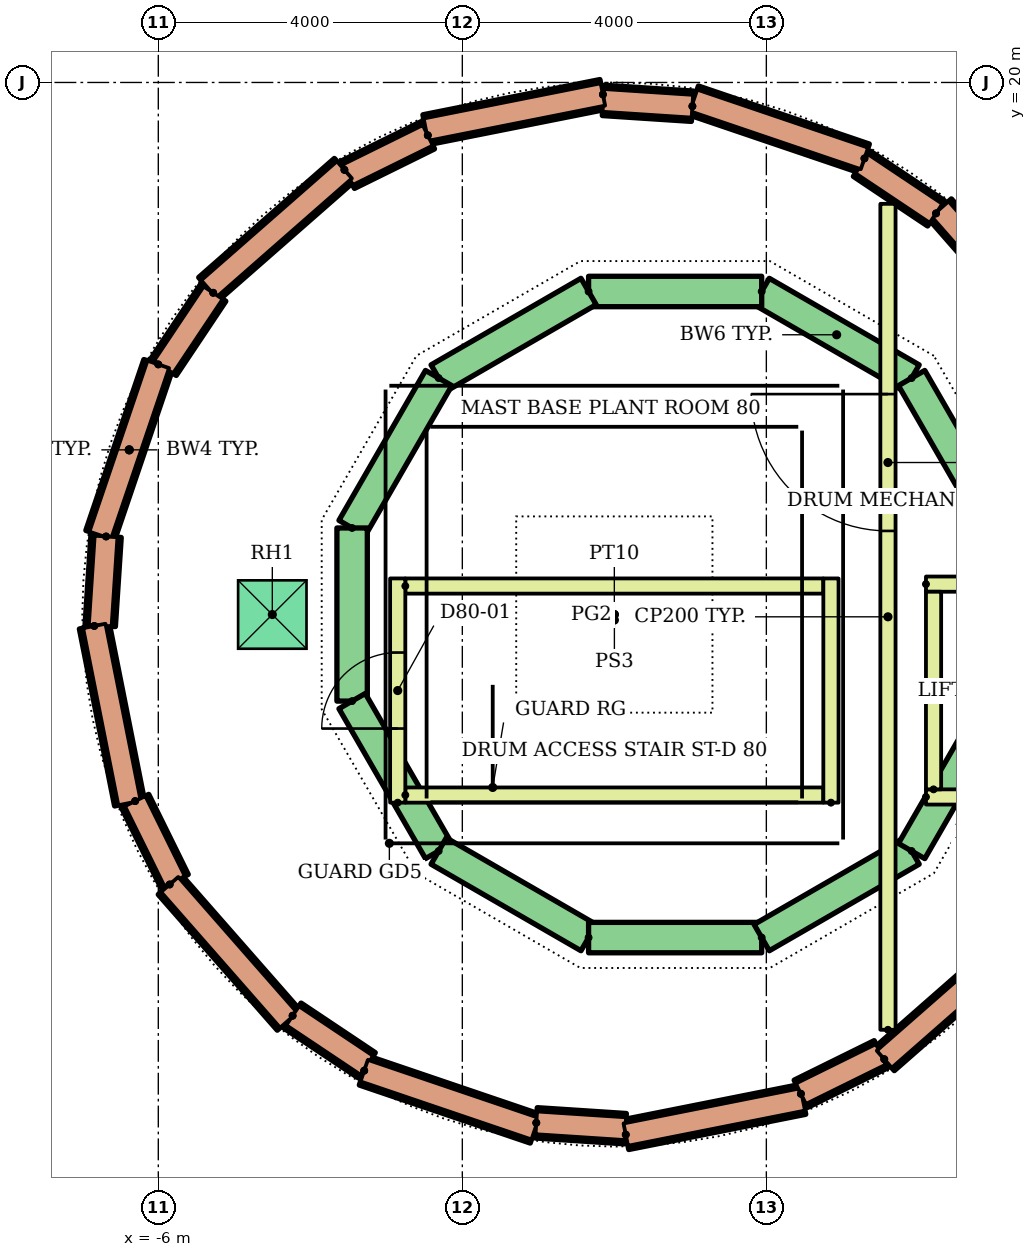
"""IFC4 building model, lengths in metres.
Left out: names, types, materials, properties, quantities, classifications, styles, units other than length and angle.
Written with IfcOpenShell. Run it as: python <this file> out.ifc"""

import sys

from ifc_helpers import new_model, si_unit, direction, frame, frame_2d, origin, place, context, subcontext, project, spatial, rectangle, extrude, element, fill, save


model = new_model("IFC4")
c1 = context("Model", 3, precision=1e-05, world=origin(), true_north=direction((0.0, 1.0)))
c2 = subcontext(c1, "Body", "Model", "MODEL_VIEW")
j1 = project(units=[si_unit("LENGTHUNIT", "METRE"), si_unit("PLANEANGLEUNIT", "RADIAN")], contexts=[c1])
p1 = place(None, origin())
s1 = spatial("IfcSite", under=j1, at=p1, CompositionType="ELEMENT")
p2 = place(p1, origin())
s2 = spatial("IfcBuilding", under=s1, at=p2, CompositionType="ELEMENT")
p3 = place(p2, frame((0.0, 0.0, 313.4)))
s3 = spatial("IfcBuildingStorey", under=s2, at=p3, CompositionType="ELEMENT", Elevation=313.4)
p4 = place(p3, frame((5.85, 16.552, 0.0), z_axis=(0.0, 0.0, 1.0), x_axis=(-0.659326702302, 0.751856568523, 0.0)))
e1 = element("IfcWall", 1, at=p4, inside=s3, PredefinedType="STANDARD", context=c2, shape_type="SweptSolid", body=[
    extrude(rectangle(XDim=2.375, YDim=0.4, at=frame_2d((1.188, 0.0))), origin(), (0.0, 0.0, 1.0), 4.58),
])
p5 = place(p3, frame((4.233, 18.278, 0.0), z_axis=(0.0, 0.0, 1.0), x_axis=(-0.831506353537, 0.55551524194, 0.0)))
e2 = element("IfcWall", 2, at=p5, inside=s3, PredefinedType="STANDARD", context=c2, shape_type="SweptSolid", body=[
    extrude(rectangle(XDim=1.175, YDim=0.4, at=frame_2d((0.587, 0.0))), origin(), (0.0, 0.0, 1.0), 4.58),
])
p6 = place(p3, frame((3.291, 19.001, 0.0), z_axis=(0.0, 0.0, 1.0), x_axis=(-0.946921154093, 0.321465904771, 0.0)))
e3 = element("IfcWall", 3, at=p6, inside=s3, PredefinedType="STANDARD", context=c2, shape_type="SweptSolid", body=[
    extrude(rectangle(XDim=2.375, YDim=0.4, at=frame_2d((1.188, 0.0))), origin(), (0.0, 0.0, 1.0), 4.58),
])
p7 = place(p3, frame((1.027, 19.687, 0.0), z_axis=(0.0, 0.0, 1.0), x_axis=(-0.997854501177, 0.065470561939, 0.0)))
e4 = element("IfcWall", 4, at=p7, inside=s3, PredefinedType="STANDARD", context=c2, shape_type="SweptSolid", body=[
    extrude(rectangle(XDim=1.175, YDim=0.4, at=frame_2d((0.587, 0.0))), origin(), (0.0, 0.0, 1.0), 4.58),
])
p8 = place(p3, frame((-0.15, 19.842, 0.0), z_axis=(0.0, 0.0, 1.0), x_axis=(-0.980777883009, -0.195127507542, 0.0)))
e5 = element("IfcWall", 5, at=p8, inside=s3, PredefinedType="STANDARD", context=c2, shape_type="SweptSolid", body=[
    extrude(rectangle(XDim=2.375, YDim=0.4, at=frame_2d((1.188, 0.0))), origin(), (0.0, 0.0, 1.0), 4.58),
])
p9 = place(p3, frame((-2.454, 19.305, 0.0), z_axis=(0.0, 0.0, 1.0), x_axis=(-0.896948795246, -0.442134435107, 0.0)))
e6 = element("IfcWall", 6, at=p9, inside=s3, PredefinedType="STANDARD", context=c2, shape_type="SweptSolid", body=[
    extrude(rectangle(XDim=1.175, YDim=0.4, at=frame_2d((0.587, 0.0))), origin(), (0.0, 0.0, 1.0), 4.58),
])
p10 = place(p3, frame((-3.552, 18.85, 0.0), z_axis=(0.0, 0.0, 1.0), x_axis=(-0.751856568523, -0.659326702302, 0.0)))
e7 = element("IfcWall", 7, at=p10, inside=s3, PredefinedType="STANDARD", context=c2, shape_type="SweptSolid", body=[
    extrude(rectangle(XDim=2.375, YDim=0.4, at=frame_2d((1.188, 0.0))), origin(), (0.0, 0.0, 1.0), 4.58),
])
p11 = place(p3, frame((-5.278, 17.233, 0.0), z_axis=(0.0, 0.0, 1.0), x_axis=(-0.55551524194, -0.831506353537, 0.0)))
e8 = element("IfcWall", 8, at=p11, inside=s3, PredefinedType="STANDARD", context=c2, shape_type="SweptSolid", body=[
    extrude(rectangle(XDim=1.175, YDim=0.4, at=frame_2d((0.587, 0.0))), origin(), (0.0, 0.0, 1.0), 4.58),
])
p12 = place(p3, frame((-6.001, 16.291, 0.0), z_axis=(0.0, 0.0, 1.0), x_axis=(-0.321465904771, -0.946921154093, 0.0)))
e9 = element("IfcWall", 9, at=p12, inside=s3, PredefinedType="STANDARD", context=c2, shape_type="SweptSolid", body=[
    extrude(rectangle(XDim=2.375, YDim=0.4, at=frame_2d((1.188, 0.0))), origin(), (0.0, 0.0, 1.0), 4.58),
])
p13 = place(p3, frame((-6.687, 14.027, 0.0), z_axis=(0.0, 0.0, 1.0), x_axis=(-0.065470561939, -0.997854501177, 0.0)))
e10 = element("IfcWall", 10, at=p13, inside=s3, PredefinedType="STANDARD", context=c2, shape_type="SweptSolid", body=[
    extrude(rectangle(XDim=1.175, YDim=0.4, at=frame_2d((0.587, 0.0))), origin(), (0.0, 0.0, 1.0), 4.58),
])
p14 = place(p3, frame((-6.842, 12.85, 0.0), z_axis=(0.0, 0.0, 1.0), x_axis=(0.195127507542, -0.980777883009, 0.0)))
e11 = element("IfcWall", 11, at=p14, inside=s3, PredefinedType="STANDARD", context=c2, shape_type="SweptSolid", body=[
    extrude(rectangle(XDim=2.375, YDim=0.4, at=frame_2d((1.188, 0.0))), origin(), (0.0, 0.0, 1.0), 4.58),
])
p15 = place(p3, frame((-6.305, 10.546, 0.0), z_axis=(0.0, 0.0, 1.0), x_axis=(0.442134435107, -0.896948795246, 0.0)))
e12 = element("IfcWall", 12, at=p15, inside=s3, PredefinedType="STANDARD", context=c2, shape_type="SweptSolid", body=[
    extrude(rectangle(XDim=1.175, YDim=0.4, at=frame_2d((0.587, 0.0))), origin(), (0.0, 0.0, 1.0), 4.58),
])
p16 = place(p3, frame((-5.85, 9.448, 0.0), z_axis=(0.0, 0.0, 1.0), x_axis=(0.659326702302, -0.751856568523, 0.0)))
e13 = element("IfcWall", 13, at=p16, inside=s3, PredefinedType="STANDARD", context=c2, shape_type="SweptSolid", body=[
    extrude(rectangle(XDim=2.375, YDim=0.4, at=frame_2d((1.188, 0.0))), origin(), (0.0, 0.0, 1.0), 4.58),
])
p17 = place(p3, frame((-4.233, 7.722, 0.0), z_axis=(0.0, 0.0, 1.0), x_axis=(0.831506353537, -0.55551524194, 0.0)))
e14 = element("IfcWall", 14, at=p17, inside=s3, PredefinedType="STANDARD", context=c2, shape_type="SweptSolid", body=[
    extrude(rectangle(XDim=1.175, YDim=0.4, at=frame_2d((0.587, 0.0))), origin(), (0.0, 0.0, 1.0), 4.58),
])
p18 = place(p3, frame((-3.291, 6.999, 0.0), z_axis=(0.0, 0.0, 1.0), x_axis=(0.946921154093, -0.321465904771, 0.0)))
e15 = element("IfcWall", 15, at=p18, inside=s3, PredefinedType="STANDARD", context=c2, shape_type="SweptSolid", body=[
    extrude(rectangle(XDim=2.375, YDim=0.4, at=frame_2d((1.188, 0.0))), origin(), (0.0, 0.0, 1.0), 4.58),
])
p19 = place(p3, frame((-1.027, 6.313, 0.0), z_axis=(0.0, 0.0, 1.0), x_axis=(0.997854501177, -0.065470561939, 0.0)))
e16 = element("IfcWall", 16, at=p19, inside=s3, PredefinedType="STANDARD", context=c2, shape_type="SweptSolid", body=[
    extrude(rectangle(XDim=1.175, YDim=0.4, at=frame_2d((0.587, 0.0))), origin(), (0.0, 0.0, 1.0), 4.58),
])
p20 = place(p3, frame((0.15, 6.158, 0.0), z_axis=(0.0, 0.0, 1.0), x_axis=(0.980777883009, 0.195127507542, 0.0)))
e17 = element("IfcWall", 17, at=p20, inside=s3, PredefinedType="STANDARD", context=c2, shape_type="SweptSolid", body=[
    extrude(rectangle(XDim=2.375, YDim=0.4, at=frame_2d((1.188, 0.0))), origin(), (0.0, 0.0, 1.0), 4.58),
])
p21 = place(p3, frame((2.454, 6.695, 0.0), z_axis=(0.0, 0.0, 1.0), x_axis=(0.896948795246, 0.442134435107, 0.0)))
e18 = element("IfcWall", 18, at=p21, inside=s3, PredefinedType="STANDARD", context=c2, shape_type="SweptSolid", body=[
    extrude(rectangle(XDim=1.175, YDim=0.4, at=frame_2d((0.587, 0.0))), origin(), (0.0, 0.0, 1.0), 4.58),
])
p22 = place(p3, frame((3.552, 7.15, 0.0), z_axis=(0.0, 0.0, 1.0), x_axis=(0.751856568523, 0.659326702302, 0.0)))
e19 = element("IfcWall", 19, at=p22, inside=s3, PredefinedType="STANDARD", context=c2, shape_type="SweptSolid", body=[
    extrude(rectangle(XDim=2.375, YDim=0.4, at=frame_2d((1.188, 0.0))), origin(), (0.0, 0.0, 1.0), 4.58),
])
p23 = place(p3, frame((5.85, 16.552, 5.0), z_axis=(0.0, 0.0, 1.0), x_axis=(-0.659326702302, 0.751856568523, 0.0)))
e20 = element("IfcWall", 20, at=p23, inside=s3, PredefinedType="PARAPET", context=c2, shape_type="SweptSolid", body=[
    extrude(rectangle(XDim=2.375, YDim=0.3, at=frame_2d((1.188, 0.0))), origin(), (0.0, 0.0, 1.0), 0.9),
])
p24 = place(p3, frame((4.233, 18.278, 5.0), z_axis=(0.0, 0.0, 1.0), x_axis=(-0.831506353537, 0.55551524194, 0.0)))
e21 = element("IfcWall", 21, at=p24, inside=s3, PredefinedType="PARAPET", context=c2, shape_type="SweptSolid", body=[
    extrude(rectangle(XDim=1.175, YDim=0.3, at=frame_2d((0.587, 0.0))), origin(), (0.0, 0.0, 1.0), 0.9),
])
p25 = place(p3, frame((3.291, 19.001, 5.0), z_axis=(0.0, 0.0, 1.0), x_axis=(-0.946921154093, 0.321465904771, 0.0)))
e22 = element("IfcWall", 22, at=p25, inside=s3, PredefinedType="PARAPET", context=c2, shape_type="SweptSolid", body=[
    extrude(rectangle(XDim=2.375, YDim=0.3, at=frame_2d((1.188, 0.0))), origin(), (0.0, 0.0, 1.0), 0.9),
])
p26 = place(p3, frame((1.027, 19.687, 5.0), z_axis=(0.0, 0.0, 1.0), x_axis=(-0.997854501177, 0.065470561939, 0.0)))
e23 = element("IfcWall", 23, at=p26, inside=s3, PredefinedType="PARAPET", context=c2, shape_type="SweptSolid", body=[
    extrude(rectangle(XDim=1.175, YDim=0.3, at=frame_2d((0.587, 0.0))), origin(), (0.0, 0.0, 1.0), 0.9),
])
p27 = place(p3, frame((-0.15, 19.842, 5.0), z_axis=(0.0, 0.0, 1.0), x_axis=(-0.980777883009, -0.195127507542, 0.0)))
e24 = element("IfcWall", 24, at=p27, inside=s3, PredefinedType="PARAPET", context=c2, shape_type="SweptSolid", body=[
    extrude(rectangle(XDim=2.375, YDim=0.3, at=frame_2d((1.188, 0.0))), origin(), (0.0, 0.0, 1.0), 0.9),
])
p28 = place(p3, frame((-2.454, 19.305, 5.0), z_axis=(0.0, 0.0, 1.0), x_axis=(-0.896948795246, -0.442134435107, 0.0)))
e25 = element("IfcWall", 25, at=p28, inside=s3, PredefinedType="PARAPET", context=c2, shape_type="SweptSolid", body=[
    extrude(rectangle(XDim=1.175, YDim=0.3, at=frame_2d((0.587, 0.0))), origin(), (0.0, 0.0, 1.0), 0.9),
])
p29 = place(p3, frame((-3.552, 18.85, 5.0), z_axis=(0.0, 0.0, 1.0), x_axis=(-0.751856568523, -0.659326702302, 0.0)))
e26 = element("IfcWall", 26, at=p29, inside=s3, PredefinedType="PARAPET", context=c2, shape_type="SweptSolid", body=[
    extrude(rectangle(XDim=2.375, YDim=0.3, at=frame_2d((1.188, 0.0))), origin(), (0.0, 0.0, 1.0), 0.9),
])
p30 = place(p3, frame((-5.278, 17.233, 5.0), z_axis=(0.0, 0.0, 1.0), x_axis=(-0.55551524194, -0.831506353537, 0.0)))
e27 = element("IfcWall", 27, at=p30, inside=s3, PredefinedType="PARAPET", context=c2, shape_type="SweptSolid", body=[
    extrude(rectangle(XDim=1.175, YDim=0.3, at=frame_2d((0.587, 0.0))), origin(), (0.0, 0.0, 1.0), 0.9),
])
p31 = place(p3, frame((-6.001, 16.291, 5.0), z_axis=(0.0, 0.0, 1.0), x_axis=(-0.321465904771, -0.946921154093, 0.0)))
e28 = element("IfcWall", 28, at=p31, inside=s3, PredefinedType="PARAPET", context=c2, shape_type="SweptSolid", body=[
    extrude(rectangle(XDim=2.375, YDim=0.3, at=frame_2d((1.188, 0.0))), origin(), (0.0, 0.0, 1.0), 0.9),
])
p32 = place(p3, frame((-6.687, 14.027, 5.0), z_axis=(0.0, 0.0, 1.0), x_axis=(-0.065470561939, -0.997854501177, 0.0)))
e29 = element("IfcWall", 29, at=p32, inside=s3, PredefinedType="PARAPET", context=c2, shape_type="SweptSolid", body=[
    extrude(rectangle(XDim=1.175, YDim=0.3, at=frame_2d((0.587, 0.0))), origin(), (0.0, 0.0, 1.0), 0.9),
])
p33 = place(p3, frame((-6.842, 12.85, 5.0), z_axis=(0.0, 0.0, 1.0), x_axis=(0.195127507542, -0.980777883009, 0.0)))
e30 = element("IfcWall", 30, at=p33, inside=s3, PredefinedType="PARAPET", context=c2, shape_type="SweptSolid", body=[
    extrude(rectangle(XDim=2.375, YDim=0.3, at=frame_2d((1.188, 0.0))), origin(), (0.0, 0.0, 1.0), 0.9),
])
p34 = place(p3, frame((-6.305, 10.546, 5.0), z_axis=(0.0, 0.0, 1.0), x_axis=(0.442134435107, -0.896948795246, 0.0)))
e31 = element("IfcWall", 31, at=p34, inside=s3, PredefinedType="PARAPET", context=c2, shape_type="SweptSolid", body=[
    extrude(rectangle(XDim=1.175, YDim=0.3, at=frame_2d((0.587, 0.0))), origin(), (0.0, 0.0, 1.0), 0.9),
])
p35 = place(p3, frame((-5.85, 9.448, 5.0), z_axis=(0.0, 0.0, 1.0), x_axis=(0.659326702302, -0.751856568523, 0.0)))
e32 = element("IfcWall", 32, at=p35, inside=s3, PredefinedType="PARAPET", context=c2, shape_type="SweptSolid", body=[
    extrude(rectangle(XDim=2.375, YDim=0.3, at=frame_2d((1.188, 0.0))), origin(), (0.0, 0.0, 1.0), 0.9),
])
p36 = place(p3, frame((-4.233, 7.722, 5.0), z_axis=(0.0, 0.0, 1.0), x_axis=(0.831506353537, -0.55551524194, 0.0)))
e33 = element("IfcWall", 33, at=p36, inside=s3, PredefinedType="PARAPET", context=c2, shape_type="SweptSolid", body=[
    extrude(rectangle(XDim=1.175, YDim=0.3, at=frame_2d((0.587, 0.0))), origin(), (0.0, 0.0, 1.0), 0.9),
])
p37 = place(p3, frame((-3.291, 6.999, 5.0), z_axis=(0.0, 0.0, 1.0), x_axis=(0.946921154093, -0.321465904771, 0.0)))
e34 = element("IfcWall", 34, at=p37, inside=s3, PredefinedType="PARAPET", context=c2, shape_type="SweptSolid", body=[
    extrude(rectangle(XDim=2.375, YDim=0.3, at=frame_2d((1.188, 0.0))), origin(), (0.0, 0.0, 1.0), 0.9),
])
p38 = place(p3, frame((-1.027, 6.313, 5.0), z_axis=(0.0, 0.0, 1.0), x_axis=(0.997854501177, -0.065470561939, 0.0)))
e35 = element("IfcWall", 35, at=p38, inside=s3, PredefinedType="PARAPET", context=c2, shape_type="SweptSolid", body=[
    extrude(rectangle(XDim=1.175, YDim=0.3, at=frame_2d((0.587, 0.0))), origin(), (0.0, 0.0, 1.0), 0.9),
])
p39 = place(p3, frame((0.15, 6.158, 5.0), z_axis=(0.0, 0.0, 1.0), x_axis=(0.980777883009, 0.195127507542, 0.0)))
e36 = element("IfcWall", 36, at=p39, inside=s3, PredefinedType="PARAPET", context=c2, shape_type="SweptSolid", body=[
    extrude(rectangle(XDim=2.375, YDim=0.3, at=frame_2d((1.188, 0.0))), origin(), (0.0, 0.0, 1.0), 0.9),
])
p40 = place(p3, frame((2.454, 6.695, 5.0), z_axis=(0.0, 0.0, 1.0), x_axis=(0.896948795246, 0.442134435107, 0.0)))
e37 = element("IfcWall", 37, at=p40, inside=s3, PredefinedType="PARAPET", context=c2, shape_type="SweptSolid", body=[
    extrude(rectangle(XDim=1.175, YDim=0.3, at=frame_2d((0.587, 0.0))), origin(), (0.0, 0.0, 1.0), 0.9),
])
p41 = place(p3, frame((3.552, 7.15, 5.0), z_axis=(0.0, 0.0, 1.0), x_axis=(0.751856568523, 0.659326702302, 0.0)))
e38 = element("IfcWall", 38, at=p41, inside=s3, PredefinedType="PARAPET", context=c2, shape_type="SweptSolid", body=[
    extrude(rectangle(XDim=2.375, YDim=0.3, at=frame_2d((1.188, 0.0))), origin(), (0.0, 0.0, 1.0), 0.9),
])
for number, where, z_axis, x_axis in (
    (39, (3.911, 16.111, 5.0), (0.0, 0.0, 1.0), (-0.866, 0.5, 0.0)),
    (40, (1.939, 17.25, 5.0), (0.0, 0.0, 1.0), (-1.0, 0.0, 0.0)),
    (41, (-0.339, 17.25, 5.0), (0.0, 0.0, 1.0), (-0.866, -0.5, 0.0)),
    (42, (-2.311, 16.111, 5.0), (0.0, 0.0, 1.0), (-0.5, -0.866, 0.0)),
):
    element("IfcWall", number, at=place(p3, frame(where, z_axis=z_axis, x_axis=x_axis)), inside=s3, PredefinedType="STANDARD", context=c2, shape_type="SweptSolid", body=[
        extrude(rectangle(XDim=2.278, YDim=0.4, at=frame_2d((1.139, 0.0))), origin(), (0.0, 0.0, 1.0), 4.3),
    ])
p42 = place(p3, frame((-3.45, 14.139, 5.0), z_axis=(0.0, 0.0, 1.0), x_axis=(0.0, -1.0, 0.0)))
e43 = element("IfcWall", 43, at=p42, inside=s3, PredefinedType="STANDARD", context=c2, shape_type="SweptSolid", body=[
    extrude(rectangle(XDim=2.278, YDim=0.4, at=frame_2d((1.139, 0.0))), origin(), (0.0, 0.0, 1.0), 4.3),
])
for number, where, z_axis, x_axis in (
    (44, (-3.45, 11.861, 5.0), (0.0, 0.0, 1.0), (0.5, -0.866, 0.0)),
    (45, (-2.311, 9.889, 5.0), (0.0, 0.0, 1.0), (0.866, -0.5, 0.0)),
):
    element("IfcWall", number, at=place(p3, frame(where, z_axis=z_axis, x_axis=x_axis)), inside=s3, PredefinedType="STANDARD", context=c2, shape_type="SweptSolid", body=[
        extrude(rectangle(XDim=2.278, YDim=0.4, at=frame_2d((1.139, 0.0))), origin(), (0.0, 0.0, 1.0), 4.3),
    ])
p43 = place(p3, frame((-0.339, 8.75, 5.0)))
e46 = element("IfcWall", 46, at=p43, inside=s3, PredefinedType="STANDARD", context=c2, shape_type="SweptSolid", body=[
    extrude(rectangle(XDim=2.278, YDim=0.4, at=frame_2d((1.139, 0.0))), origin(), (0.0, 0.0, 1.0), 4.3),
])
for number, where, z_axis, x_axis in (
    (47, (1.939, 8.75, 5.0), (0.0, 0.0, 1.0), (0.866, 0.5, 0.0)),
    (48, (3.911, 9.889, 5.0), (0.0, 0.0, 1.0), (0.5, 0.866, 0.0)),
    (49, (5.05, 14.139, 5.0), (0.0, 0.0, 1.0), (-0.5, 0.866, 0.0)),
):
    element("IfcWall", number, at=place(p3, frame(where, z_axis=z_axis, x_axis=x_axis)), inside=s3, PredefinedType="STANDARD", context=c2, shape_type="SweptSolid", body=[
        extrude(rectangle(XDim=2.278, YDim=0.4, at=frame_2d((1.139, 0.0))), origin(), (0.0, 0.0, 1.0), 4.3),
    ])
p44 = place(p3, frame((3.6, 7.537, 0.0), z_axis=(0.0, 0.0, 1.0), x_axis=(0.0, 1.0, 0.0)))
e50 = element("IfcWall", 50, at=p44, inside=s3, PredefinedType="PARTITIONING", context=c2, shape_type="SweptSolid", body=[
    extrude(rectangle(XDim=10.867, YDim=0.2, at=frame_2d((5.433, 0.0))), origin(), (0.0, 0.0, 1.0), 5.0),
])
p45 = place(p44, frame((6.563, 0.0, 0.0)))
e51 = element("IfcOpeningElement", 51, at=p45, cuts=e50, PredefinedType="OPENING", context=c2, shape_type="SweptSolid", body=[
    extrude(rectangle(XDim=1.8, YDim=2.1, at=frame_2d((0.9, 1.05))), frame((0.0, 0.11, 0.0), z_axis=(0.0, -1.0, 0.0), x_axis=(1.0, 0.0, 0.0)), (0.0, 0.0, 1.0), 0.22),
])
for number, where in (
    (52, (-2.75, 10.625, 0.0)),
    (53, (-2.75, 13.375, 0.0)),
):
    element("IfcWall", number, at=place(p3, frame(where)), inside=s3, PredefinedType="PARTITIONING", context=c2, shape_type="SweptSolid", body=[
        extrude(rectangle(XDim=5.5, YDim=0.2, at=frame_2d((2.75, 0.0))), origin(), (0.0, 0.0, 1.0), 5.0),
    ])
p46 = place(p3, frame((2.85, 10.525, 0.0), z_axis=(0.0, 0.0, 1.0), x_axis=(0.0, 1.0, 0.0)))
e54 = element("IfcWall", 54, at=p46, inside=s3, PredefinedType="PARTITIONING", context=c2, shape_type="SweptSolid", body=[
    extrude(rectangle(XDim=2.95, YDim=0.2, at=frame_2d((1.475, 0.0))), origin(), (0.0, 0.0, 1.0), 5.0),
])
p47 = place(p3, frame((-2.85, 10.525, 0.0), z_axis=(0.0, 0.0, 1.0), x_axis=(0.0, 1.0, 0.0)))
e55 = element("IfcWall", 55, at=p47, inside=s3, PredefinedType="PARTITIONING", context=c2, shape_type="SweptSolid", body=[
    extrude(rectangle(XDim=2.95, YDim=0.2, at=frame_2d((1.475, 0.0))), origin(), (0.0, 0.0, 1.0), 5.0),
])
p48 = place(p47, frame((0.975, 0.0, 0.0)))
e56 = element("IfcOpeningElement", 56, at=p48, cuts=e55, PredefinedType="OPENING", context=c2, shape_type="SweptSolid", body=[
    extrude(rectangle(XDim=1.0, YDim=2.1, at=frame_2d((0.5, 1.05))), frame((0.0, 0.11, 0.0), z_axis=(0.0, -1.0, 0.0), x_axis=(1.0, 0.0, 0.0)), (0.0, 0.0, 1.0), 0.22),
])
p49 = place(p3, frame((4.1, 10.6, 0.0)))
e57 = element("IfcWall", 57, at=p49, inside=s3, PredefinedType="PARTITIONING", context=c2, shape_type="SweptSolid", body=[
    extrude(rectangle(XDim=1.96, YDim=0.2, at=frame_2d((0.98, 0.0))), origin(), (0.0, 0.0, 1.0), 5.0),
])
p50 = place(p49, frame((0.65, 0.0, 0.0)))
e58 = element("IfcOpeningElement", 58, at=p50, cuts=e57, PredefinedType="OPENING", context=c2, shape_type="SweptSolid", body=[
    extrude(rectangle(XDim=1.1, YDim=2.1, at=frame_2d((0.55, 1.05))), frame((0.0, 0.11, 0.0), z_axis=(0.0, -1.0, 0.0), x_axis=(1.0, 0.0, 0.0)), (0.0, 0.0, 1.0), 0.22),
])
p51 = place(p3, frame((4.1, 13.4, 0.0)))
e59 = element("IfcWall", 59, at=p51, inside=s3, PredefinedType="PARTITIONING", context=c2, shape_type="SweptSolid", body=[
    extrude(rectangle(XDim=2.4, YDim=0.2, at=frame_2d((1.2, 0.0))), origin(), (0.0, 0.0, 1.0), 5.0),
])
p52 = place(p3, frame((4.2, 10.7, 0.0), z_axis=(0.0, 0.0, 1.0), x_axis=(0.0, 1.0, 0.0)))
e60 = element("IfcWall", 60, at=p52, inside=s3, PredefinedType="PARTITIONING", context=c2, shape_type="SweptSolid", body=[
    extrude(rectangle(XDim=2.6, YDim=0.2, at=frame_2d((1.3, 0.0))), origin(), (0.0, 0.0, 1.0), 5.0),
])
p53 = place(p48, origin())
e61 = element("IfcDoor", 61, at=p53, inside=s3, OperationType="SINGLE_SWING_LEFT", PredefinedType="DOOR", context=c2, shape_type="SweptSolid", body=[
    extrude(rectangle(XDim=1.0, YDim=2.1, at=frame_2d((0.5, 1.05))), frame((0.0, 0.025, 0.0), z_axis=(0.0, -1.0, 0.0), x_axis=(1.0, 0.0, 0.0)), (0.0, 0.0, 1.0), 0.05),
])
fill(e56, e61)
p54 = place(p45, origin())
e62 = element("IfcDoor", 62, at=p54, inside=s3, OperationType="DOUBLE_DOOR_SINGLE_SWING", PredefinedType="DOOR", context=c2, shape_type="SweptSolid", body=[
    extrude(rectangle(XDim=1.8, YDim=2.1, at=frame_2d((0.9, 1.05))), frame((0.0, 0.025, 0.0), z_axis=(0.0, -1.0, 0.0), x_axis=(1.0, 0.0, 0.0)), (0.0, 0.0, 1.0), 0.05),
])
fill(e51, e62)
save(model, sys.argv[1])
